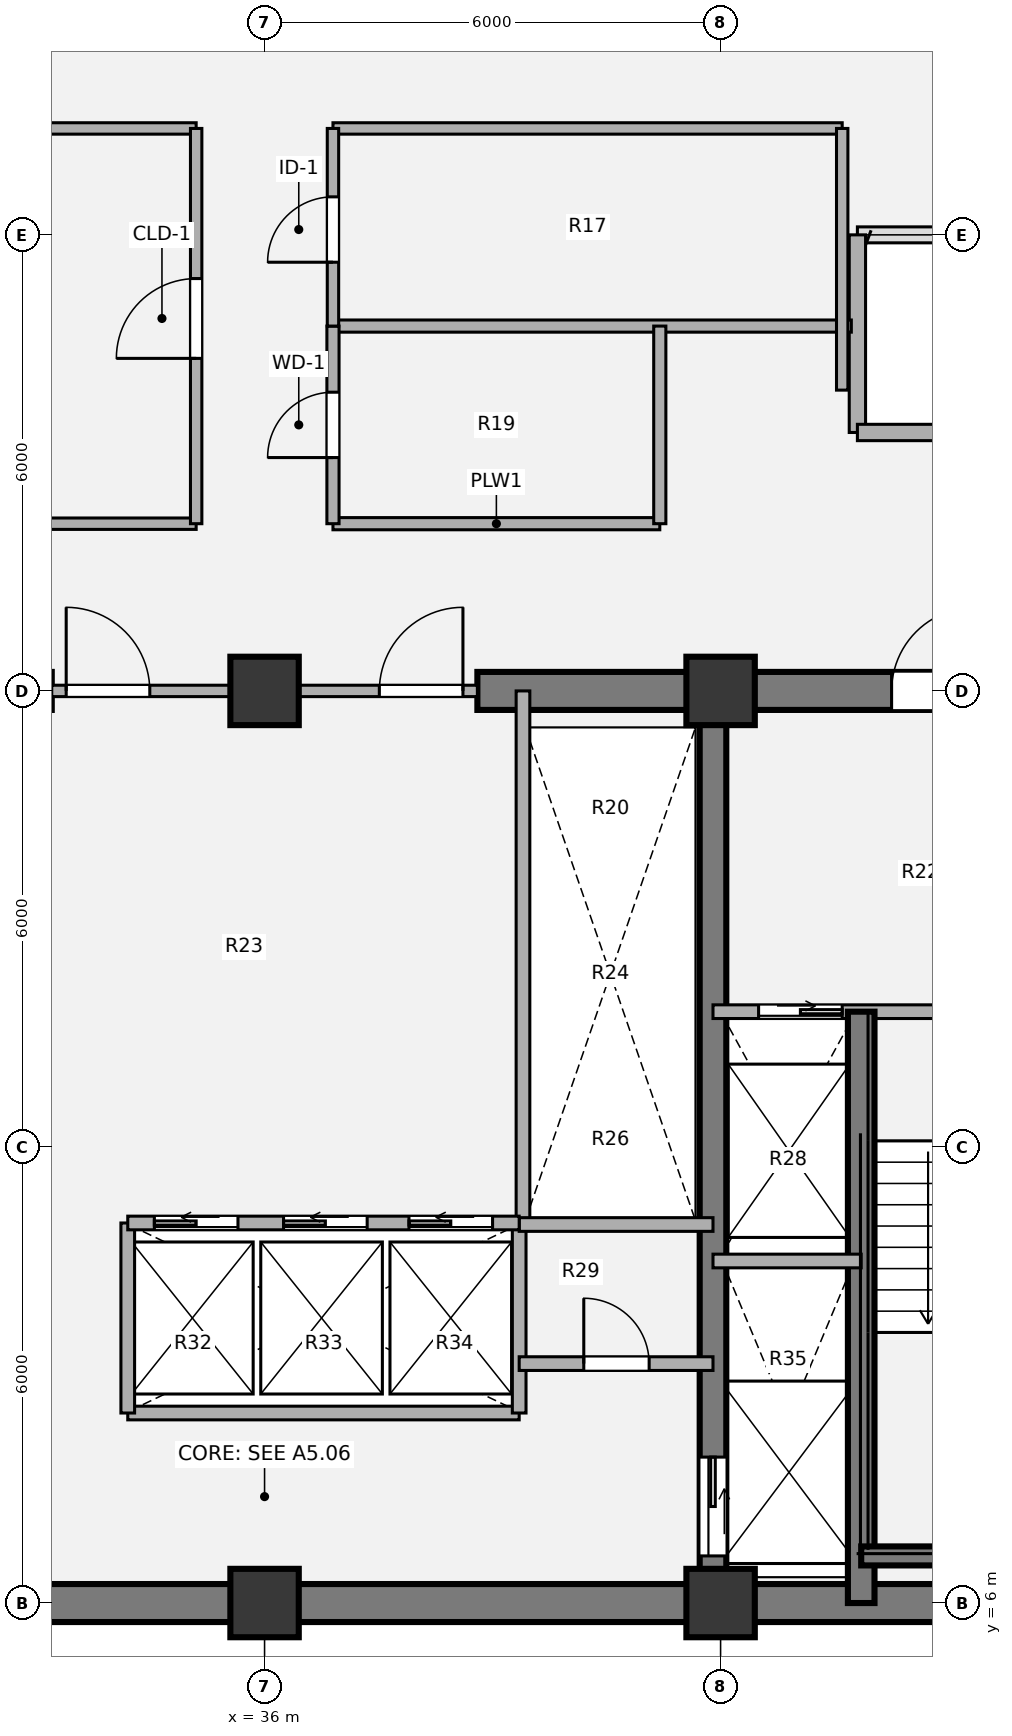
"""IFC4 building model, lengths in metres.
Left out: names, types, materials, properties, quantities, classifications, styles, units other than length and angle.
Written with IfcOpenShell. Run it as: python <this file> out.ifc"""

import sys

from ifc_helpers import new_model, si_unit, direction, frame, frame_2d, origin, origin_2d, place, context, subcontext, project, spatial, rectangle, extrude, source, transform, mapped, element, fill, save


model = new_model("IFC4")
c1 = context("Model", 3, precision=1e-05, world=origin(), true_north=direction((0.0, 1.0)))
c2 = subcontext(c1, "Body", "Model", "MODEL_VIEW")
j1 = project(units=[si_unit("LENGTHUNIT", "METRE"), si_unit("PLANEANGLEUNIT", "RADIAN")], contexts=[c1])
p1 = place(None, origin())
s1 = spatial("IfcSite", under=j1, at=p1, CompositionType="ELEMENT")
p2 = place(p1, origin())
s2 = spatial("IfcBuilding", under=s1, at=p2, CompositionType="ELEMENT")
p3 = place(p2, frame((0.0, 0.0, 138.96)))
s3 = spatial("IfcBuildingStorey", under=s2, at=p3, CompositionType="ELEMENT", Elevation=138.96)
m1 = source(origin(), c2, "Body", "SweptSolid", [
    extrude(rectangle(XDim=0.9, YDim=0.9, at=origin_2d()), origin(), (0.0, 0.0, 1.0), 3.78),
])
for number, where, z_axis, x_axis in (
    (1, (36.0, 6.0, 0.0), (0.0, 0.0, 1.0), (1.0, 0.0, 0.0)),
    (2, (42.0, 6.0, 0.0), (0.0, 0.0, 1.0), (1.0, 0.0, 0.0)),
    (3, (36.0, 18.0, 0.0), (0.0, 0.0, 1.0), (1.0, 0.0, 0.0)),
    (4, (42.0, 18.0, 0.0), (0.0, 0.0, 1.0), (1.0, 0.0, 0.0)),
):
    element("IfcColumn", number, at=place(p3, frame(where, z_axis=z_axis, x_axis=x_axis)), inside=s3, PredefinedType="COLUMN", context=c2, shape_type="MappedRepresentation", body=[
        mapped(m1, transform((0.0, 0.0, 0.0), x_axis=(1.0, 0.0, 0.0), y_axis=(0.0, 1.0, 0.0), z_axis=(0.0, 0.0, 1.0), scale=1.0)),
    ])
p4 = place(p3, frame((48.25, 6.0, 0.0), z_axis=(0.0, 0.0, 1.0), x_axis=(-1.0, 0.0, 0.0)))
e5 = element("IfcWall", 5, at=p4, inside=s3, PredefinedType="SHEAR", context=c2, shape_type="SweptSolid", body=[
    extrude(rectangle(XDim=24.5, YDim=0.5, at=frame_2d((12.25, 0.0))), origin(), (0.0, 0.0, 1.0), 3.78),
])
p5 = place(p3, frame((23.75, 18.0, 0.0), z_axis=(0.0, 0.0, 1.0), x_axis=(1.0, 0.0, 0.0)))
e6 = element("IfcWall", 6, at=p5, inside=s3, PredefinedType="SHEAR", context=c2, shape_type="SweptSolid", body=[
    extrude(rectangle(XDim=9.45, YDim=0.5, at=frame_2d((4.725, 0.0))), origin(), (0.0, 0.0, 1.0), 3.78),
])
p6 = place(p5, frame((2.95, 0.0, 0.0)))
e7 = element("IfcOpeningElement", 7, at=p6, cuts=e6, PredefinedType="OPENING", context=c2, shape_type="SweptSolid", body=[
    extrude(rectangle(XDim=1.1, YDim=2.1, at=origin_2d()), frame((0.55, 0.26, 1.05), z_axis=(0.0, -1.0, 0.0), x_axis=(1.0, 0.0, 0.0)), (0.0, 0.0, 1.0), 0.52),
])
p7 = place(p3, frame((38.8, 18.0, 0.0), z_axis=(0.0, 0.0, 1.0), x_axis=(1.0, 0.0, 0.0)))
e8 = element("IfcWall", 8, at=p7, inside=s3, PredefinedType="SHEAR", context=c2, shape_type="SweptSolid", body=[
    extrude(rectangle(XDim=9.45, YDim=0.5, at=frame_2d((4.725, 0.0))), origin(), (0.0, 0.0, 1.0), 3.78),
])
p8 = place(p7, frame((5.45, 0.0, 0.0)))
e9 = element("IfcOpeningElement", 9, at=p8, cuts=e8, PredefinedType="OPENING", context=c2, shape_type="SweptSolid", body=[
    extrude(rectangle(XDim=1.1, YDim=2.1, at=origin_2d()), frame((0.55, 0.26, 1.05), z_axis=(0.0, -1.0, 0.0), x_axis=(1.0, 0.0, 0.0)), (0.0, 0.0, 1.0), 0.52),
])
p9 = place(p3, frame((41.9, 18.0, 0.0), z_axis=(0.0, 0.0, 1.0), x_axis=(0.0, -1.0, 0.0)))
e10 = element("IfcWall", 10, at=p9, inside=s3, PredefinedType="SHEAR", context=c2, shape_type="SweptSolid", body=[
    extrude(rectangle(XDim=12.0, YDim=0.35, at=frame_2d((6.0, 0.0))), origin(), (0.0, 0.0, 1.0), 3.78),
])
p10 = place(p9, frame((10.08, 0.0, 0.0)))
e11 = element("IfcOpeningElement", 11, at=p10, cuts=e10, PredefinedType="OPENING", context=c2, shape_type="SweptSolid", body=[
    extrude(rectangle(XDim=1.3, YDim=2.1, at=origin_2d()), frame((0.65, 0.185, 1.05), z_axis=(0.0, -1.0, 0.0), x_axis=(1.0, 0.0, 0.0)), (0.0, 0.0, 1.0), 0.37),
])
p11 = place(p3, frame((43.8, 24.0, 0.0), z_axis=(0.0, 0.0, 1.0), x_axis=(0.0, -1.0, 0.0)))
e12 = element("IfcWall", 12, at=p11, inside=s3, PredefinedType="SOLIDWALL", context=c2, shape_type="SweptSolid", body=[
    extrude(rectangle(XDim=2.6, YDim=0.215, at=frame_2d((1.3, 0.0))), origin(), (0.0, 0.0, 1.0), 3.53),
])
p12 = place(p3, frame((43.8, 21.4, 0.0), z_axis=(0.0, 0.0, 1.0), x_axis=(1.0, 0.0, 0.0)))
e13 = element("IfcWall", 13, at=p12, inside=s3, PredefinedType="SOLIDWALL", context=c2, shape_type="SweptSolid", body=[
    extrude(rectangle(XDim=3.85, YDim=0.215, at=frame_2d((1.925, 0.0))), origin(), (0.0, 0.0, 1.0), 3.53),
])
p13 = place(p3, frame((34.2, 8.5, 0.0), z_axis=(0.0, 0.0, 1.0), x_axis=(1.0, 0.0, 0.0)))
e14 = element("IfcWall", 14, at=p13, inside=s3, PredefinedType="PARTITIONING", context=c2, shape_type="SweptSolid", body=[
    extrude(rectangle(XDim=5.15, YDim=0.18, at=frame_2d((2.575, 0.0))), origin(), (0.0, 0.0, 1.0), 3.5),
])
for number, where, z_axis, x_axis in (
    (15, (34.2, 8.5, 0.0), (0.0, 0.0, 1.0), (0.0, 1.0, 0.0)),
    (16, (39.35, 8.5, 0.0), (0.0, 0.0, 1.0), (0.0, 1.0, 0.0)),
):
    element("IfcWall", number, at=place(p3, frame(where, z_axis=z_axis, x_axis=x_axis)), inside=s3, PredefinedType="PARTITIONING", context=c2, shape_type="SweptSolid", body=[
        extrude(rectangle(XDim=2.5, YDim=0.18, at=frame_2d((1.25, 0.0))), origin(), (0.0, 0.0, 1.0), 3.5),
    ])
p14 = place(p3, frame((39.4, 11.0, 0.0), z_axis=(0.0, 0.0, 1.0), x_axis=(0.0, 1.0, 0.0)))
e17 = element("IfcWall", 17, at=p14, inside=s3, PredefinedType="PARTITIONING", context=c2, shape_type="SweptSolid", body=[
    extrude(rectangle(XDim=7.0, YDim=0.18, at=frame_2d((3.5, 0.0))), origin(), (0.0, 0.0, 1.0), 3.5),
])
p15 = place(p3, frame((39.35, 10.98, 0.0), z_axis=(0.0, 0.0, 1.0), x_axis=(1.0, 0.0, 0.0)))
e18 = element("IfcWall", 18, at=p15, inside=s3, PredefinedType="PARTITIONING", context=c2, shape_type="SweptSolid", body=[
    extrude(rectangle(XDim=2.55, YDim=0.18, at=frame_2d((1.275, 0.0))), origin(), (0.0, 0.0, 1.0), 3.5),
])
p16 = place(p3, frame((39.35, 9.15, 0.0), z_axis=(0.0, 0.0, 1.0), x_axis=(1.0, 0.0, 0.0)))
e19 = element("IfcWall", 19, at=p16, inside=s3, PredefinedType="PARTITIONING", context=c2, shape_type="SweptSolid", body=[
    extrude(rectangle(XDim=2.55, YDim=0.18, at=frame_2d((1.275, 0.0))), origin(), (0.0, 0.0, 1.0), 3.5),
])
p17 = place(p16, frame((0.85, 0.0, 0.0)))
e20 = element("IfcOpeningElement", 20, at=p17, cuts=e19, PredefinedType="OPENING", context=c2, shape_type="SweptSolid", body=[
    extrude(rectangle(XDim=0.86, YDim=2.1, at=origin_2d()), frame((0.43, 0.1, 1.05), z_axis=(0.0, -1.0, 0.0), x_axis=(1.0, 0.0, 0.0)), (0.0, 0.0, 1.0), 0.2),
])
p18 = place(p3, frame((33.2, 18.0, 0.0), z_axis=(0.0, 0.0, 1.0), x_axis=(1.0, 0.0, 0.0)))
e21 = element("IfcWall", 21, at=p18, inside=s3, PredefinedType="PARTITIONING", context=c2, shape_type="SweptSolid", body=[
    extrude(rectangle(XDim=5.6, YDim=0.15, at=frame_2d((2.8, 0.0))), origin(), (0.0, 0.0, 1.0), 2.315),
])
p19 = place(p18, frame((0.19, 0.0, 0.0)))
e22 = element("IfcOpeningElement", 22, at=p19, cuts=e21, PredefinedType="OPENING", context=c2, shape_type="SweptSolid", body=[
    extrude(rectangle(XDim=1.1, YDim=2.1, at=origin_2d()), frame((0.55, 0.085, 1.05), z_axis=(0.0, -1.0, 0.0), x_axis=(1.0, 0.0, 0.0)), (0.0, 0.0, 1.0), 0.17),
])
p20 = place(p18, frame((4.31, 0.0, 0.0)))
e23 = element("IfcOpeningElement", 23, at=p20, cuts=e21, PredefinedType="OPENING", context=c2, shape_type="SweptSolid", body=[
    extrude(rectangle(XDim=1.1, YDim=2.1, at=origin_2d()), frame((0.55, 0.085, 1.05), z_axis=(0.0, -1.0, 0.0), x_axis=(1.0, 0.0, 0.0)), (0.0, 0.0, 1.0), 0.17),
])
p21 = place(p3, frame((41.9, 13.78, 0.0), z_axis=(0.0, 0.0, 1.0), x_axis=(1.0, 0.0, 0.0)))
e24 = element("IfcWall", 24, at=p21, inside=s3, PredefinedType="PARTITIONING", context=c2, shape_type="SweptSolid", body=[
    extrude(rectangle(XDim=6.1, YDim=0.18, at=frame_2d((3.05, 0.0))), origin(), (0.0, 0.0, 1.0), 3.5),
])
p22 = place(p21, frame((0.6, 0.0, 0.0)))
e25 = element("IfcOpeningElement", 25, at=p22, cuts=e24, PredefinedType="OPENING", context=c2, shape_type="SweptSolid", body=[
    extrude(rectangle(XDim=1.1, YDim=2.1, at=origin_2d()), frame((0.55, 0.1, 1.05), z_axis=(0.0, -1.0, 0.0), x_axis=(1.0, 0.0, 0.0)), (0.0, 0.0, 1.0), 0.2),
])
p23 = place(p21, frame((3.8, 0.0, 0.0)))
e26 = element("IfcOpeningElement", 26, at=p23, cuts=e24, PredefinedType="OPENING", context=c2, shape_type="SweptSolid", body=[
    extrude(rectangle(XDim=1.1, YDim=2.1, at=origin_2d()), frame((0.55, 0.1, 1.05), z_axis=(0.0, -1.0, 0.0), x_axis=(1.0, 0.0, 0.0)), (0.0, 0.0, 1.0), 0.2),
])
p24 = place(p3, frame((43.85, 6.0, 0.0), z_axis=(0.0, 0.0, 1.0), x_axis=(0.0, 1.0, 0.0)))
e27 = element("IfcWall", 27, at=p24, inside=s3, PredefinedType="SHEAR", context=c2, shape_type="SweptSolid", body=[
    extrude(rectangle(XDim=7.78, YDim=0.35, at=frame_2d((3.89, 0.0))), origin(), (0.0, 0.0, 1.0), 3.85),
])
p25 = place(p3, frame((43.85, 6.62, 0.0), z_axis=(0.0, 0.0, 1.0), x_axis=(1.0, 0.0, 0.0)))
e28 = element("IfcWall", 28, at=p25, inside=s3, PredefinedType="SHEAR", context=c2, shape_type="SweptSolid", body=[
    extrude(rectangle(XDim=3.57, YDim=0.25, at=frame_2d((1.785, 0.0))), origin(), (0.0, 0.0, 1.0), 3.85),
])
p26 = place(p3, frame((41.9, 10.5, 0.0), z_axis=(0.0, 0.0, 1.0), x_axis=(1.0, 0.0, 0.0)))
e29 = element("IfcWall", 29, at=p26, inside=s3, PredefinedType="PARTITIONING", context=c2, shape_type="SweptSolid", body=[
    extrude(rectangle(XDim=1.95, YDim=0.18, at=frame_2d((0.975, 0.0))), origin(), (0.0, 0.0, 1.0), 3.5),
])
p27 = place(p3, frame((34.2, 11.0, 0.0), z_axis=(0.0, 0.0, 1.0), x_axis=(1.0, 0.0, 0.0)))
e30 = element("IfcWall", 30, at=p27, inside=s3, PredefinedType="PARTITIONING", context=c2, shape_type="SweptSolid", body=[
    extrude(rectangle(XDim=5.15, YDim=0.18, at=frame_2d((2.575, 0.0))), origin(), (0.0, 0.0, 1.0), 3.5),
])
p28 = place(p27, frame((0.35, 0.0, 0.0)))
e31 = element("IfcOpeningElement", 31, at=p28, cuts=e30, PredefinedType="OPENING", context=c2, shape_type="SweptSolid", body=[
    extrude(rectangle(XDim=1.1, YDim=2.1, at=origin_2d()), frame((0.55, 0.1, 1.05), z_axis=(0.0, -1.0, 0.0), x_axis=(1.0, 0.0, 0.0)), (0.0, 0.0, 1.0), 0.2),
])
p29 = place(p27, frame((2.05, 0.0, 0.0)))
e32 = element("IfcOpeningElement", 32, at=p29, cuts=e30, PredefinedType="OPENING", context=c2, shape_type="SweptSolid", body=[
    extrude(rectangle(XDim=1.1, YDim=2.1, at=origin_2d()), frame((0.55, 0.1, 1.05), z_axis=(0.0, -1.0, 0.0), x_axis=(1.0, 0.0, 0.0)), (0.0, 0.0, 1.0), 0.2),
])
p30 = place(p27, frame((3.7, 0.0, 0.0)))
e33 = element("IfcOpeningElement", 33, at=p30, cuts=e30, PredefinedType="OPENING", context=c2, shape_type="SweptSolid", body=[
    extrude(rectangle(XDim=1.1, YDim=2.1, at=origin_2d()), frame((0.55, 0.1, 1.05), z_axis=(0.0, -1.0, 0.0), x_axis=(1.0, 0.0, 0.0)), (0.0, 0.0, 1.0), 0.2),
])
p31 = place(p3, frame((28.4, 20.2, 0.0), z_axis=(0.0, 0.0, 1.0), x_axis=(1.0, 0.0, 0.0)))
e34 = element("IfcWall", 34, at=p31, inside=s3, PredefinedType="PARTITIONING", context=c2, shape_type="SweptSolid", body=[
    extrude(rectangle(XDim=6.7, YDim=0.15, at=frame_2d((3.35, 0.0))), origin(), (0.0, 0.0, 1.0), 3.5),
])
p32 = place(p3, frame((36.9, 20.2, 0.0), z_axis=(0.0, 0.0, 1.0), x_axis=(1.0, 0.0, 0.0)))
e35 = element("IfcWall", 35, at=p32, inside=s3, PredefinedType="PLUMBINGWALL", context=c2, shape_type="SweptSolid", body=[
    extrude(rectangle(XDim=4.3, YDim=0.16, at=frame_2d((2.15, 0.0))), origin(), (0.0, 0.0, 1.0), 3.5),
])
p33 = place(p3, frame((36.9, 22.8, 0.0), z_axis=(0.0, 0.0, 1.0), x_axis=(1.0, 0.0, 0.0)))
e36 = element("IfcWall", 36, at=p33, inside=s3, PredefinedType="PLUMBINGWALL", context=c2, shape_type="SweptSolid", body=[
    extrude(rectangle(XDim=6.82, YDim=0.16, at=frame_2d((3.41, 0.0))), origin(), (0.0, 0.0, 1.0), 3.5),
])
for number, where, z_axis, x_axis in (
    (37, (28.4, 25.4, 0.0), (0.0, 0.0, 1.0), (1.0, 0.0, 0.0)),
    (38, (36.9, 25.4, 0.0), (0.0, 0.0, 1.0), (1.0, 0.0, 0.0)),
):
    element("IfcWall", number, at=place(p3, frame(where, z_axis=z_axis, x_axis=x_axis)), inside=s3, PredefinedType="PARTITIONING", context=c2, shape_type="SweptSolid", body=[
        extrude(rectangle(XDim=6.7, YDim=0.15, at=frame_2d((3.35, 0.0))), origin(), (0.0, 0.0, 1.0), 3.5),
    ])
p34 = place(p3, frame((35.1, 20.2, 0.0), z_axis=(0.0, 0.0, 1.0), x_axis=(0.0, 1.0, 0.0)))
e39 = element("IfcWall", 39, at=p34, inside=s3, PredefinedType="PARTITIONING", context=c2, shape_type="SweptSolid", body=[
    extrude(rectangle(XDim=5.2, YDim=0.15, at=frame_2d((2.6, 0.0))), origin(), (0.0, 0.0, 1.0), 3.5),
])
p35 = place(p34, frame((2.175, 0.0, 0.0)))
e40 = element("IfcOpeningElement", 40, at=p35, cuts=e39, PredefinedType="OPENING", context=c2, shape_type="SweptSolid", body=[
    extrude(rectangle(XDim=1.05, YDim=2.1, at=origin_2d()), frame((0.525, 0.085, 1.05), z_axis=(0.0, -1.0, 0.0), x_axis=(1.0, 0.0, 0.0)), (0.0, 0.0, 1.0), 0.17),
])
p36 = place(p3, frame((36.9, 20.2, 0.0), z_axis=(0.0, 0.0, 1.0), x_axis=(0.0, 1.0, 0.0)))
e41 = element("IfcWall", 41, at=p36, inside=s3, PredefinedType="PLUMBINGWALL", context=c2, shape_type="SweptSolid", body=[
    extrude(rectangle(XDim=2.6, YDim=0.16, at=frame_2d((1.3, 0.0))), origin(), (0.0, 0.0, 1.0), 3.5),
])
p37 = place(p36, frame((0.87, 0.0, 0.0)))
e42 = element("IfcOpeningElement", 42, at=p37, cuts=e41, PredefinedType="OPENING", context=c2, shape_type="SweptSolid", body=[
    extrude(rectangle(XDim=0.86, YDim=2.1, at=origin_2d()), frame((0.43, 0.09, 1.05), z_axis=(0.0, -1.0, 0.0), x_axis=(1.0, 0.0, 0.0)), (0.0, 0.0, 1.0), 0.18),
])
p38 = place(p3, frame((36.9, 22.8, 0.0), z_axis=(0.0, 0.0, 1.0), x_axis=(0.0, 1.0, 0.0)))
e43 = element("IfcWall", 43, at=p38, inside=s3, PredefinedType="PARTITIONING", context=c2, shape_type="SweptSolid", body=[
    extrude(rectangle(XDim=2.6, YDim=0.15, at=frame_2d((1.3, 0.0))), origin(), (0.0, 0.0, 1.0), 3.5),
])
p39 = place(p38, frame((0.84, 0.0, 0.0)))
e44 = element("IfcOpeningElement", 44, at=p39, cuts=e43, PredefinedType="OPENING", context=c2, shape_type="SweptSolid", body=[
    extrude(rectangle(XDim=0.86, YDim=2.1, at=origin_2d()), frame((0.43, 0.085, 1.05), z_axis=(0.0, -1.0, 0.0), x_axis=(1.0, 0.0, 0.0)), (0.0, 0.0, 1.0), 0.17),
])
p40 = place(p3, frame((41.2, 20.2, 0.0), z_axis=(0.0, 0.0, 1.0), x_axis=(0.0, 1.0, 0.0)))
e45 = element("IfcWall", 45, at=p40, inside=s3, PredefinedType="PLUMBINGWALL", context=c2, shape_type="SweptSolid", body=[
    extrude(rectangle(XDim=2.6, YDim=0.16, at=frame_2d((1.3, 0.0))), origin(), (0.0, 0.0, 1.0), 2.815),
])
p41 = place(p3, frame((43.6, 21.958, 0.0), z_axis=(0.0, 0.0, 1.0), x_axis=(0.0, 1.0, 0.0)))
e46 = element("IfcWall", 46, at=p41, inside=s3, PredefinedType="PARTITIONING", context=c2, shape_type="SweptSolid", body=[
    extrude(rectangle(XDim=3.442, YDim=0.15, at=frame_2d((1.721, 0.0))), origin(), (0.0, 0.0, 1.0), 3.5),
])
m2 = source(origin(), c2, "Body", "SweptSolid", [
    extrude(rectangle(XDim=0.86, YDim=2.1, at=origin_2d()), frame((0.43, 0.025, 1.05), z_axis=(0.0, -1.0, 0.0), x_axis=(1.0, 0.0, 0.0)), (0.0, 0.0, 1.0), 0.05),
])
p42 = place(p17, origin())
e47 = element("IfcDoor", 47, at=p42, inside=s3, OperationType="SINGLE_SWING_LEFT", PredefinedType="DOOR", context=c2, shape_type="MappedRepresentation", body=[
    mapped(m2, transform((0.0, 0.0, 0.0), x_axis=(1.0, 0.0, 0.0), y_axis=(0.0, 1.0, 0.0), z_axis=(0.0, 0.0, 1.0), scale=1.0)),
])
fill(e20, e47)
m3 = source(origin(), c2, "Body", "SweptSolid", [
    extrude(rectangle(XDim=1.1, YDim=2.1, at=origin_2d()), frame((0.55, 0.025, 1.05), z_axis=(0.0, -1.0, 0.0), x_axis=(1.0, 0.0, 0.0)), (0.0, 0.0, 1.0), 0.05),
])
p43 = place(p19, origin())
e48 = element("IfcDoor", 48, at=p43, inside=s3, OperationType="SINGLE_SWING_LEFT", PredefinedType="DOOR", context=c2, shape_type="MappedRepresentation", body=[
    mapped(m3, transform((0.0, 0.0, 0.0), x_axis=(1.0, 0.0, 0.0), y_axis=(0.0, 1.0, 0.0), z_axis=(0.0, 0.0, 1.0), scale=1.0)),
])
fill(e22, e48)
p44 = place(p20, origin())
e49 = element("IfcDoor", 49, at=p44, inside=s3, OperationType="SINGLE_SWING_RIGHT", PredefinedType="DOOR", context=c2, shape_type="MappedRepresentation", body=[
    mapped(m3, transform((0.0, 0.0, 0.0), x_axis=(1.0, 0.0, 0.0), y_axis=(0.0, 1.0, 0.0), z_axis=(0.0, 0.0, 1.0), scale=1.0)),
])
fill(e23, e49)
m4 = source(origin(), c2, "Body", "SweptSolid", [
    extrude(rectangle(XDim=1.1, YDim=2.1, at=origin_2d()), frame((0.55, 0.025, 1.05), z_axis=(0.0, -1.0, 0.0), x_axis=(1.0, 0.0, 0.0)), (0.0, 0.0, 1.0), 0.05),
])
p45 = place(p22, origin())
e50 = element("IfcDoor", 50, at=p45, inside=s3, OperationType="SLIDING_TO_RIGHT", PredefinedType="DOOR", context=c2, shape_type="MappedRepresentation", body=[
    mapped(m4, transform((0.0, 0.0, 0.0), x_axis=(1.0, 0.0, 0.0), y_axis=(0.0, 1.0, 0.0), z_axis=(0.0, 0.0, 1.0), scale=1.0)),
])
fill(e25, e50)
m5 = source(origin(), c2, "Body", "SweptSolid", [
    extrude(rectangle(XDim=1.3, YDim=2.1, at=origin_2d()), frame((0.65, 0.025, 1.05), z_axis=(0.0, -1.0, 0.0), x_axis=(1.0, 0.0, 0.0)), (0.0, 0.0, 1.0), 0.05),
])
p46 = place(p10, origin())
e51 = element("IfcDoor", 51, at=p46, inside=s3, OperationType="SLIDING_TO_LEFT", PredefinedType="DOOR", context=c2, shape_type="MappedRepresentation", body=[
    mapped(m5, transform((0.0, 0.0, 0.0), x_axis=(1.0, 0.0, 0.0), y_axis=(0.0, 1.0, 0.0), z_axis=(0.0, 0.0, 1.0), scale=1.0)),
])
fill(e11, e51)
p47 = place(p8, origin())
e52 = element("IfcDoor", 52, at=p47, inside=s3, OperationType="SINGLE_SWING_RIGHT", PredefinedType="DOOR", context=c2, shape_type="MappedRepresentation", body=[
    mapped(m3, transform((0.0, 0.0, 0.0), x_axis=(1.0, 0.0, 0.0), y_axis=(0.0, 1.0, 0.0), z_axis=(0.0, 0.0, 1.0), scale=1.0)),
])
fill(e9, e52)
p48 = place(p28, origin())
e53 = element("IfcDoor", 53, at=p48, inside=s3, OperationType="SLIDING_TO_LEFT", PredefinedType="DOOR", context=c2, shape_type="MappedRepresentation", body=[
    mapped(m4, transform((0.0, 0.0, 0.0), x_axis=(1.0, 0.0, 0.0), y_axis=(0.0, 1.0, 0.0), z_axis=(0.0, 0.0, 1.0), scale=1.0)),
])
fill(e31, e53)
p49 = place(p29, origin())
e54 = element("IfcDoor", 54, at=p49, inside=s3, OperationType="SLIDING_TO_LEFT", PredefinedType="DOOR", context=c2, shape_type="MappedRepresentation", body=[
    mapped(m4, transform((0.0, 0.0, 0.0), x_axis=(1.0, 0.0, 0.0), y_axis=(0.0, 1.0, 0.0), z_axis=(0.0, 0.0, 1.0), scale=1.0)),
])
fill(e32, e54)
p50 = place(p30, origin())
e55 = element("IfcDoor", 55, at=p50, inside=s3, OperationType="SLIDING_TO_LEFT", PredefinedType="DOOR", context=c2, shape_type="MappedRepresentation", body=[
    mapped(m4, transform((0.0, 0.0, 0.0), x_axis=(1.0, 0.0, 0.0), y_axis=(0.0, 1.0, 0.0), z_axis=(0.0, 0.0, 1.0), scale=1.0)),
])
fill(e33, e55)
m6 = source(origin(), c2, "Body", "SweptSolid", [
    extrude(rectangle(XDim=1.05, YDim=2.1, at=origin_2d()), frame((0.525, 0.025, 1.05), z_axis=(0.0, -1.0, 0.0), x_axis=(1.0, 0.0, 0.0)), (0.0, 0.0, 1.0), 0.05),
])
p51 = place(p35, origin())
e56 = element("IfcDoor", 56, at=p51, inside=s3, OperationType="SINGLE_SWING_LEFT", PredefinedType="DOOR", context=c2, shape_type="MappedRepresentation", body=[
    mapped(m6, transform((0.0, 0.0, 0.0), x_axis=(1.0, 0.0, 0.0), y_axis=(0.0, 1.0, 0.0), z_axis=(0.0, 0.0, 1.0), scale=1.0)),
])
fill(e40, e56)
m7 = source(origin(), c2, "Body", "SweptSolid", [
    extrude(rectangle(XDim=0.86, YDim=2.1, at=origin_2d()), frame((0.43, 0.025, 1.05), z_axis=(0.0, -1.0, 0.0), x_axis=(1.0, 0.0, 0.0)), (0.0, 0.0, 1.0), 0.05),
])
p52 = place(p37, origin())
e57 = element("IfcDoor", 57, at=p52, inside=s3, OperationType="SINGLE_SWING_LEFT", PredefinedType="DOOR", context=c2, shape_type="MappedRepresentation", body=[
    mapped(m7, transform((0.0, 0.0, 0.0), x_axis=(1.0, 0.0, 0.0), y_axis=(0.0, 1.0, 0.0), z_axis=(0.0, 0.0, 1.0), scale=1.0)),
])
fill(e42, e57)
p53 = place(p39, origin())
e58 = element("IfcDoor", 58, at=p53, inside=s3, OperationType="SINGLE_SWING_LEFT", PredefinedType="DOOR", context=c2, shape_type="MappedRepresentation", body=[
    mapped(m2, transform((0.0, 0.0, 0.0), x_axis=(1.0, 0.0, 0.0), y_axis=(0.0, 1.0, 0.0), z_axis=(0.0, 0.0, 1.0), scale=1.0)),
])
fill(e44, e58)
save(model, sys.argv[1])
